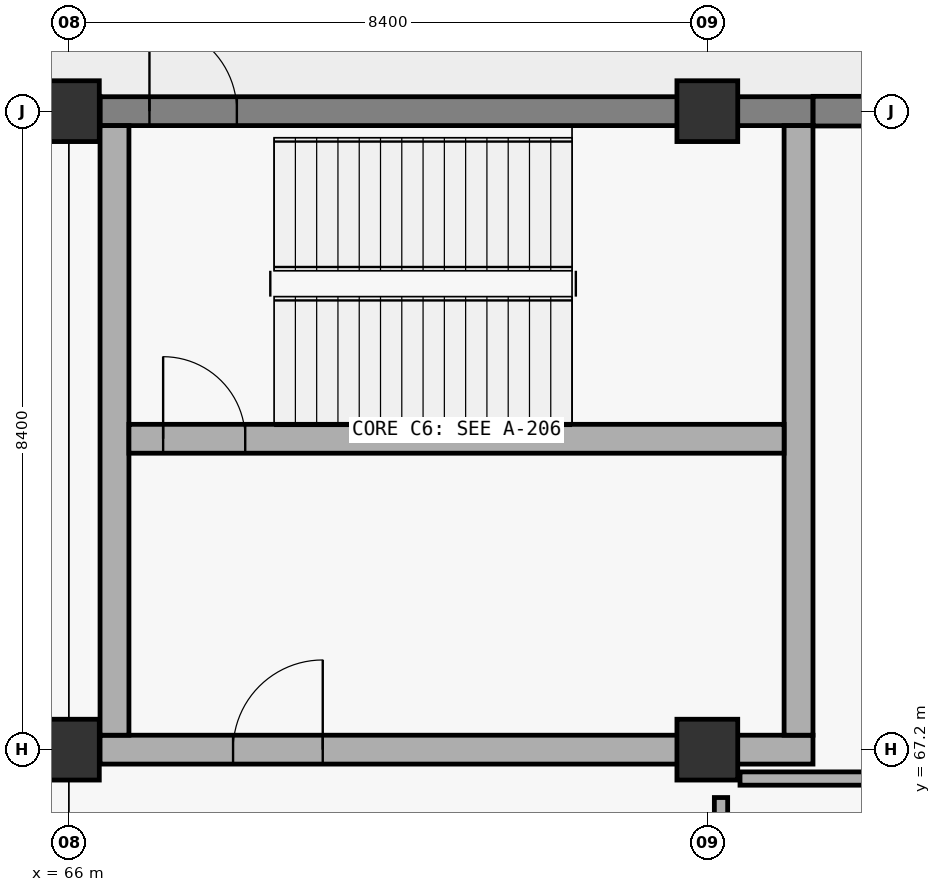
"""IFC4 building model, lengths in metres.
Left out: names, types, materials, properties, quantities, classifications, styles, units other than length and angle.
Written with IfcOpenShell. Run it as: python <this file> out.ifc"""

import sys

from ifc_helpers import new_model, si_unit, direction, frame, frame_2d, origin, origin_2d, place, context, subcontext, project, spatial, rectangle, extrude, element, fill, save


model = new_model("IFC4")
c1 = context("Model", 3, precision=1e-05, world=origin(), true_north=direction((0.0, 1.0)))
c2 = subcontext(c1, "Body", "Model", "MODEL_VIEW")
j1 = project(units=[si_unit("LENGTHUNIT", "METRE"), si_unit("PLANEANGLEUNIT", "RADIAN")], contexts=[c1])
p1 = place(None, origin())
s1 = spatial("IfcSite", under=j1, at=p1, CompositionType="ELEMENT")
p2 = place(p1, origin())
s2 = spatial("IfcBuilding", under=s1, at=p2, CompositionType="ELEMENT")
p3 = place(p2, origin())
s3 = spatial("IfcBuildingStorey", under=s2, at=p3, CompositionType="ELEMENT", Elevation=0.0)
for number, where, z_axis, x_axis in (
    (1, (66.0, 67.2, 0.0), (0.0, 0.0, 1.0), (1.0, 0.0, 0.0)),
    (2, (66.0, 75.6, 0.0), (0.0, 0.0, 1.0), (1.0, 0.0, 0.0)),
    (3, (74.4, 67.2, 0.0), (0.0, 0.0, 1.0), (1.0, 0.0, 0.0)),
    (4, (74.4, 75.6, 0.0), (0.0, 0.0, 1.0), (1.0, 0.0, 0.0)),
):
    element("IfcColumn", number, at=place(p3, frame(where, z_axis=z_axis, x_axis=x_axis)), inside=s3, PredefinedType="COLUMN", context=c2, shape_type="SweptSolid", body=[
        extrude(rectangle(XDim=0.8, YDim=0.8, at=origin_2d()), origin(), (0.0, 0.0, 1.0), 5.4),
    ])
p4 = place(p3, frame((66.41, 67.2, 0.0), z_axis=(0.0, 0.0, 1.0), x_axis=(1.0, 0.0, 0.0)))
e5 = element("IfcWall", 5, at=p4, inside=s3, PredefinedType="SHEAR", context=c2, shape_type="SweptSolid", body=[
    extrude(rectangle(XDim=9.38, YDim=0.38, at=frame_2d((4.69, 0.0))), origin(), (0.0, 0.0, 1.0), 5.4),
])
p5 = place(p4, frame((1.75, 0.0, 0.0)))
e6 = element("IfcOpeningElement", 6, at=p5, cuts=e5, PredefinedType="OPENING", context=c2, shape_type="SweptSolid", body=[
    extrude(rectangle(XDim=1.18, YDim=2.24, at=frame_2d((0.59, 1.12))), frame((0.0, 0.2, 0.0), z_axis=(0.0, -1.0, 0.0), x_axis=(1.0, 0.0, 0.0)), (0.0, 0.0, 1.0), 0.4),
])
p6 = place(p3, frame((66.41, 75.6, 0.0), z_axis=(0.0, 0.0, 1.0), x_axis=(1.0, 0.0, 0.0)))
e7 = element("IfcWall", 7, at=p6, inside=s3, PredefinedType="SHEAR", context=c2, shape_type="SweptSolid", body=[
    extrude(rectangle(XDim=9.38, YDim=0.38, at=frame_2d((4.69, 0.0))), origin(), (0.0, 0.0, 1.0), 5.4),
])
p7 = place(p6, frame((0.65, 0.0, 0.0)))
e8 = element("IfcOpeningElement", 8, at=p7, cuts=e7, PredefinedType="OPENING", context=c2, shape_type="SweptSolid", body=[
    extrude(rectangle(XDim=1.15, YDim=2.2, at=frame_2d((0.575, 1.1))), frame((0.0, 0.2, 0.0), z_axis=(0.0, -1.0, 0.0), x_axis=(1.0, 0.0, 0.0)), (0.0, 0.0, 1.0), 0.4),
])
for number, where, z_axis, x_axis in (
    (9, (66.6, 67.39, 0.0), (0.0, 0.0, 1.0), (0.0, 1.0, 0.0)),
    (10, (75.6, 67.39, 0.0), (0.0, 0.0, 1.0), (0.0, 1.0, 0.0)),
):
    element("IfcWall", number, at=place(p3, frame(where, z_axis=z_axis, x_axis=x_axis)), inside=s3, PredefinedType="SHEAR", context=c2, shape_type="SweptSolid", body=[
        extrude(rectangle(XDim=8.02, YDim=0.38, at=frame_2d((4.01, 0.0))), origin(), (0.0, 0.0, 1.0), 5.4),
    ])
p8 = place(p3, frame((66.79, 71.29, 0.0), z_axis=(0.0, 0.0, 1.0), x_axis=(1.0, 0.0, 0.0)))
e11 = element("IfcWall", 11, at=p8, inside=s3, PredefinedType="SHEAR", context=c2, shape_type="SweptSolid", body=[
    extrude(rectangle(XDim=8.62, YDim=0.38, at=frame_2d((4.31, 0.0))), origin(), (0.0, 0.0, 1.0), 5.4),
])
p9 = place(p8, frame((0.45, 0.0, 0.0)))
e12 = element("IfcOpeningElement", 12, at=p9, cuts=e11, PredefinedType="OPENING", context=c2, shape_type="SweptSolid", body=[
    extrude(rectangle(XDim=1.08, YDim=2.18, at=frame_2d((0.54, 1.09))), frame((0.0, 0.2, 0.0), z_axis=(0.0, -1.0, 0.0), x_axis=(1.0, 0.0, 0.0)), (0.0, 0.0, 1.0), 0.4),
])
p10 = place(p3, frame((58.002, 75.6, 0.0), z_axis=(0.0, 0.0, 1.0), x_axis=(1.0, 0.0, 0.0)))
e13 = element("IfcWall", 13, at=p10, inside=s3, PredefinedType="SOLIDWALL", context=c2, shape_type="SweptSolid", body=[
    extrude(rectangle(XDim=8.406, YDim=0.39, at=frame_2d((4.203, 0.0))), origin(), (0.0, 0.0, 1.0), 4.44),
])
p11 = place(p10, frame((0.668, 0.0, 0.85)))
e14 = element("IfcOpeningElement", 14, at=p11, cuts=e13, PredefinedType="OPENING", context=c2, shape_type="SweptSolid", body=[
    extrude(rectangle(XDim=1.4, YDim=2.2, at=frame_2d((0.7, 1.1))), frame((0.0, 0.205, 0.0), z_axis=(0.0, -1.0, 0.0), x_axis=(1.0, 0.0, 0.0)), (0.0, 0.0, 1.0), 0.41),
])
p12 = place(p10, frame((2.718, 0.0, 0.0)))
e15 = element("IfcOpeningElement", 15, at=p12, cuts=e13, PredefinedType="OPENING", context=c2, shape_type="SweptSolid", body=[
    extrude(rectangle(XDim=1.15, YDim=2.2, at=frame_2d((0.575, 1.1))), frame((0.0, 0.205, 0.0), z_axis=(0.0, -1.0, 0.0), x_axis=(1.0, 0.0, 0.0)), (0.0, 0.0, 1.0), 0.41),
])
p13 = place(p3, frame((75.792, 75.6, 0.0), z_axis=(0.0, 0.0, 1.0), x_axis=(1.0, 0.0, 0.0)))
e16 = element("IfcWall", 16, at=p13, inside=s3, PredefinedType="SOLIDWALL", context=c2, shape_type="SweptSolid", body=[
    extrude(rectangle(XDim=6.606, YDim=0.39, at=frame_2d((3.303, 0.0))), origin(), (0.0, 0.0, 1.0), 4.09),
])
p14 = place(p13, frame((1.428, 0.0, 0.85)))
e17 = element("IfcOpeningElement", 17, at=p14, cuts=e16, PredefinedType="OPENING", context=c2, shape_type="SweptSolid", body=[
    extrude(rectangle(XDim=1.4, YDim=2.2, at=frame_2d((0.7, 1.1))), frame((0.0, 0.205, 0.0), z_axis=(0.0, -1.0, 0.0), x_axis=(1.0, 0.0, 0.0)), (0.0, 0.0, 1.0), 0.41),
])
p15 = place(p13, frame((4.728, 0.0, 0.85)))
e18 = element("IfcOpeningElement", 18, at=p15, cuts=e16, PredefinedType="OPENING", context=c2, shape_type="SweptSolid", body=[
    extrude(rectangle(XDim=1.25, YDim=2.05, at=frame_2d((0.625, 1.025))), frame((0.0, 0.205, 0.0), z_axis=(0.0, -1.0, 0.0), x_axis=(1.0, 0.0, 0.0)), (0.0, 0.0, 1.0), 0.41),
])
p16 = place(p3, frame((74.58, 59.23, 0.0), z_axis=(0.0, 0.0, 1.0), x_axis=(0.0, 1.0, 0.0)))
e19 = element("IfcWall", 19, at=p16, inside=s3, PredefinedType="PARTITIONING", context=c2, shape_type="SweptSolid", body=[
    extrude(rectangle(XDim=7.34, YDim=0.175, at=frame_2d((3.67, 0.0))), origin(), (0.0, 0.0, 1.0), 4.59),
])
p17 = place(p16, frame((2.4, 0.0, 0.0)))
e20 = element("IfcOpeningElement", 20, at=p17, cuts=e19, PredefinedType="OPENING", context=c2, shape_type="SweptSolid", body=[
    extrude(rectangle(XDim=2.52, YDim=2.8, at=frame_2d((1.26, 1.4))), frame((0.0, 0.097, 0.0), z_axis=(0.0, -1.0, 0.0), x_axis=(1.0, 0.0, 0.0)), (0.0, 0.0, 1.0), 0.195),
])
p18 = place(p3, frame((74.83, 66.82, 0.0), z_axis=(0.0, 0.0, 1.0), x_axis=(1.0, 0.0, 0.0)))
e21 = element("IfcWall", 21, at=p18, inside=s3, PredefinedType="PARTITIONING", context=c2, shape_type="SweptSolid", body=[
    extrude(rectangle(XDim=7.14, YDim=0.175, at=frame_2d((3.57, 0.0))), origin(), (0.0, 0.0, 1.0), 4.71),
])
p19 = place(p18, frame((2.65, 0.0, 0.9)))
e22 = element("IfcOpeningElement", 22, at=p19, cuts=e21, PredefinedType="OPENING", context=c2, shape_type="SweptSolid", body=[
    extrude(rectangle(XDim=2.16, YDim=1.42, at=frame_2d((1.08, 0.71))), frame((0.0, 0.097, 0.0), z_axis=(0.0, -1.0, 0.0), x_axis=(1.0, 0.0, 0.0)), (0.0, 0.0, 1.0), 0.195),
])
p20 = place(p7, origin())
e23 = element("IfcDoor", 23, at=p20, inside=s3, OperationType="SINGLE_SWING_LEFT", PredefinedType="DOOR", context=c2, shape_type="SweptSolid", body=[
    extrude(rectangle(XDim=1.15, YDim=2.2, at=frame_2d((0.575, 1.1))), frame((0.0, 0.025, 0.0), z_axis=(0.0, -1.0, 0.0), x_axis=(1.0, 0.0, 0.0)), (0.0, 0.0, 1.0), 0.05),
])
fill(e8, e23)
p21 = place(p9, origin())
e24 = element("IfcDoor", 24, at=p21, inside=s3, OperationType="SINGLE_SWING_LEFT", PredefinedType="DOOR", context=c2, shape_type="SweptSolid", body=[
    extrude(rectangle(XDim=1.08, YDim=2.18, at=frame_2d((0.54, 1.09))), frame((0.0, 0.025, 0.0), z_axis=(0.0, -1.0, 0.0), x_axis=(1.0, 0.0, 0.0)), (0.0, 0.0, 1.0), 0.05),
])
fill(e12, e24)
p22 = place(p5, origin())
e25 = element("IfcDoor", 25, at=p22, inside=s3, OperationType="SINGLE_SWING_RIGHT", PredefinedType="DOOR", context=c2, shape_type="SweptSolid", body=[
    extrude(rectangle(XDim=1.18, YDim=2.24, at=frame_2d((0.59, 1.12))), frame((0.0, 0.025, 0.0), z_axis=(0.0, -1.0, 0.0), x_axis=(1.0, 0.0, 0.0)), (0.0, 0.0, 1.0), 0.05),
])
fill(e6, e25)
save(model, sys.argv[1])
